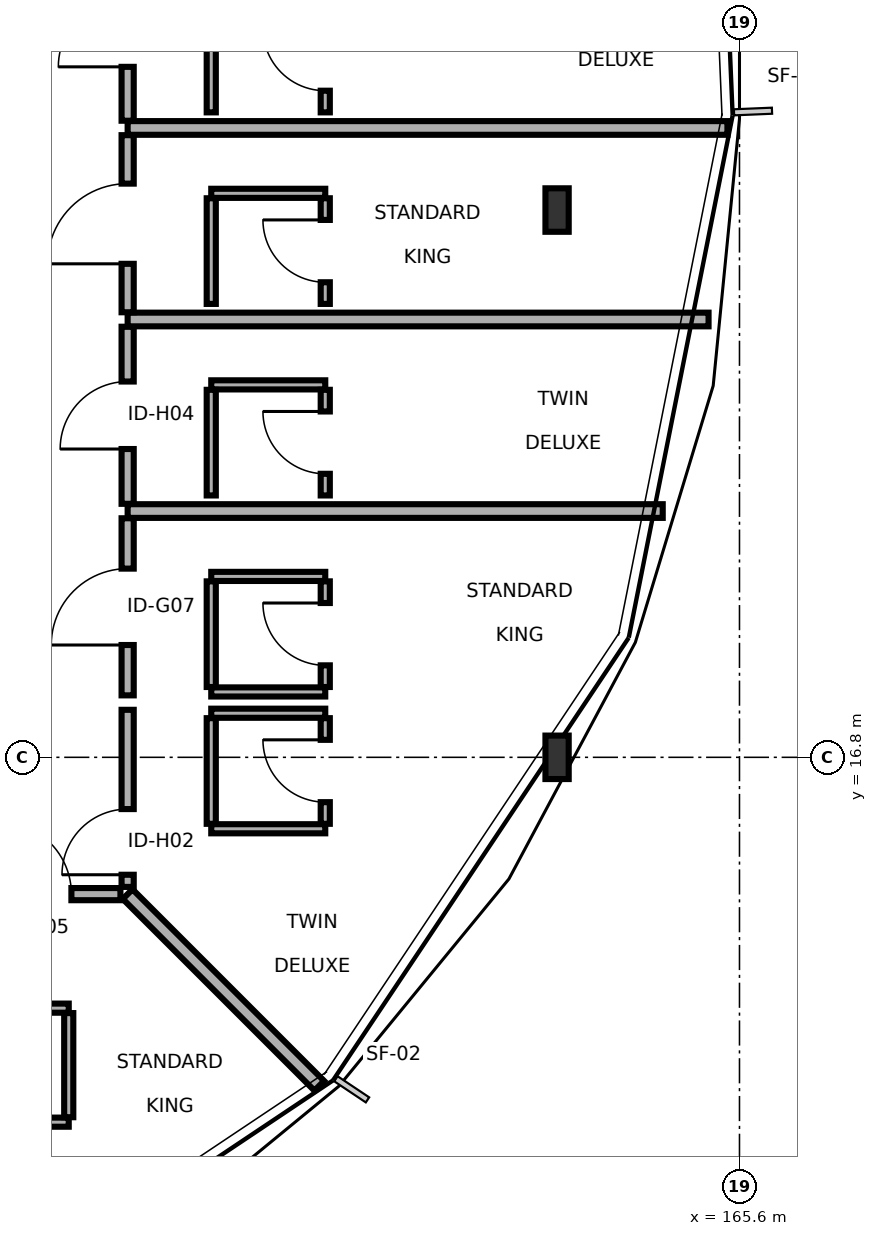
"""IFC4 building model, lengths in metres.
Left out: names, types, materials, properties, quantities, classifications, styles, units other than length and angle.
Written with IfcOpenShell. Run it as: python <this file> out.ifc"""

import sys

from ifc_helpers import new_model, si_unit, direction, frame, frame_2d, origin, origin_2d, place, context, subcontext, project, spatial, rectangle, i_section, extrude, element, fill, save


model = new_model("IFC4")
c1 = context("Model", 3, precision=1e-05, world=origin(), true_north=direction((0.0, 1.0)))
c2 = subcontext(c1, "Body", "Model", "MODEL_VIEW")
j1 = project(units=[si_unit("LENGTHUNIT", "METRE"), si_unit("PLANEANGLEUNIT", "RADIAN")], contexts=[c1])
p1 = place(None, origin())
s1 = spatial("IfcSite", under=j1, at=p1, CompositionType="ELEMENT")
p2 = place(p1, origin())
s2 = spatial("IfcBuilding", under=s1, at=p2, CompositionType="ELEMENT")
p3 = place(p2, frame((0.0, 0.0, 14.7)))
s3 = spatial("IfcBuildingStorey", under=s2, at=p3, CompositionType="ELEMENT", Elevation=14.7)
for number, where, z_axis, x_axis in (
    (1, (163.2, 16.8, 0.0), (0.0, 0.0, 1.0), (1.0, 0.0, 0.0)),
    (2, (163.2, 24.0, 0.0), (0.0, 0.0, 1.0), (1.0, 0.0, 0.0)),
):
    element("IfcColumn", number, at=place(p3, frame(where, z_axis=z_axis, x_axis=x_axis)), inside=s3, PredefinedType="COLUMN", context=c2, shape_type="SweptSolid", body=[
        extrude(i_section(OverallWidth=0.306, OverallDepth=0.572, WebThickness=0.021, FlangeThickness=0.04, FilletRadius=0.027, at=origin_2d()), origin(), (0.0, 0.0, 1.0), 3.4),
    ])
p4 = place(p3, frame((155.21, 15.0, 0.0), z_axis=(0.0, 0.0, 1.0), x_axis=(1.0, 0.0, 0.0)))
e3 = element("IfcWall", 3, at=p4, inside=s3, PredefinedType="PARTITIONING", context=c2, shape_type="SweptSolid", body=[
    extrude(rectangle(XDim=2.245, YDim=0.16, at=frame_2d((1.123, 0.0))), origin(), (0.0, 0.0, 1.0), 2.75),
])
p5 = place(p4, frame((0.645, 0.0, 0.0)))
e4 = element("IfcOpeningElement", 4, at=p5, cuts=e3, PredefinedType="OPENING", context=c2, shape_type="SweptSolid", body=[
    extrude(rectangle(XDim=0.955, YDim=2.05, at=frame_2d((0.478, 1.025))), frame((0.0, 0.09, 0.0), z_axis=(0.0, -1.0, 0.0), x_axis=(1.0, 0.0, 0.0)), (0.0, 0.0, 1.0), 0.18),
])
p6 = place(p3, frame((155.255, 12.0, 0.0), z_axis=(0.0, 0.0, 1.0), x_axis=(1.0, 0.0, 0.0)))
e5 = element("IfcWall", 5, at=p6, inside=s3, PredefinedType="PARTITIONING", context=c2, shape_type="SweptSolid", body=[
    extrude(rectangle(XDim=1.52, YDim=0.12, at=frame_2d((0.76, 0.0))), origin(), (0.0, 0.0, 1.0), 2.75),
])
p7 = place(p6, frame((0.35, 0.0, 0.0)))
e6 = element("IfcOpeningElement", 6, at=p7, cuts=e5, PredefinedType="OPENING", context=c2, shape_type="SweptSolid", body=[
    extrude(rectangle(XDim=0.82, YDim=2.08, at=frame_2d((0.41, 1.04))), frame((0.0, 0.07, 0.0), z_axis=(0.0, -1.0, 0.0), x_axis=(1.0, 0.0, 0.0)), (0.0, 0.0, 1.0), 0.14),
])
p8 = place(p3, frame((155.255, 13.5, 0.0), z_axis=(0.0, 0.0, 1.0), x_axis=(1.0, 0.0, 0.0)))
e7 = element("IfcWall", 7, at=p8, inside=s3, PredefinedType="PARTITIONING", context=c2, shape_type="SweptSolid", body=[
    extrude(rectangle(XDim=1.52, YDim=0.12, at=frame_2d((0.76, 0.0))), origin(), (0.0, 0.0, 1.0), 2.75),
])
p9 = place(p3, frame((156.775, 12.065, 0.0), z_axis=(0.0, 0.0, 1.0), x_axis=(0.0, 1.0, 0.0)))
e8 = element("IfcWall", 8, at=p9, inside=s3, PredefinedType="PARTITIONING", context=c2, shape_type="SweptSolid", body=[
    extrude(rectangle(XDim=1.37, YDim=0.12, at=frame_2d((0.685, 0.0))), origin(), (0.0, 0.0, 1.0), 3.215),
])
p10 = place(p3, frame((157.55, 15.0, 0.0), z_axis=(0.0, 0.0, 1.0), x_axis=(0.707106781187, -0.707106781187, 0.0)))
e9 = element("IfcWall", 9, at=p10, inside=s3, PredefinedType="PARTITIONING", context=c2, shape_type="SweptSolid", body=[
    extrude(rectangle(XDim=3.565, YDim=0.18, at=frame_2d((1.783, 0.0))), origin(), (0.0, 0.0, 1.0), 2.76),
])
p11 = place(p3, frame((157.55, 15.095, 0.0), z_axis=(0.0, 0.0, 1.0), x_axis=(0.0, 1.0, 0.0)))
e10 = element("IfcWall", 10, at=p11, inside=s3, PredefinedType="PARTITIONING", context=c2, shape_type="SweptSolid", body=[
    extrude(rectangle(XDim=2.33, YDim=0.16, at=frame_2d((1.165, 0.0))), origin(), (0.0, 0.0, 1.0), 2.75),
])
p12 = place(p11, frame((0.16, 0.0, 0.0)))
e11 = element("IfcOpeningElement", 11, at=p12, cuts=e10, PredefinedType="OPENING", context=c2, shape_type="SweptSolid", body=[
    extrude(rectangle(XDim=0.864, YDim=2.13, at=frame_2d((0.432, 1.065))), frame((0.0, 0.09, 0.0), z_axis=(0.0, -1.0, 0.0), x_axis=(1.0, 0.0, 0.0)), (0.0, 0.0, 1.0), 0.18),
])
for number, where, z_axis, x_axis in (
    (12, (158.65, 15.86, 0.0), (0.0, 0.0, 1.0), (1.0, 0.0, 0.0)),
    (13, (158.65, 17.38, 0.0), (0.0, 0.0, 1.0), (1.0, 0.0, 0.0)),
):
    element("IfcWall", number, at=place(p3, frame(where, z_axis=z_axis, x_axis=x_axis)), inside=s3, PredefinedType="PARTITIONING", context=c2, shape_type="SweptSolid", body=[
        extrude(rectangle(XDim=1.5, YDim=0.12, at=frame_2d((0.75, 0.0))), origin(), (0.0, 0.0, 1.0), 3.215),
    ])
p13 = place(p3, frame((158.65, 15.925, 0.0), z_axis=(0.0, 0.0, 1.0), x_axis=(0.0, 1.0, 0.0)))
e14 = element("IfcWall", 14, at=p13, inside=s3, PredefinedType="PARTITIONING", context=c2, shape_type="SweptSolid", body=[
    extrude(rectangle(XDim=1.39, YDim=0.12, at=frame_2d((0.695, 0.0))), origin(), (0.0, 0.0, 1.0), 2.75),
])
p14 = place(p3, frame((160.15, 15.925, 0.0), z_axis=(0.0, 0.0, 1.0), x_axis=(0.0, 1.0, 0.0)))
e15 = element("IfcWall", 15, at=p14, inside=s3, PredefinedType="PARTITIONING", context=c2, shape_type="SweptSolid", body=[
    extrude(rectangle(XDim=1.39, YDim=0.12, at=frame_2d((0.695, 0.0))), origin(), (0.0, 0.0, 1.0), 2.75),
])
p15 = place(p14, frame((0.285, 0.0, 0.0)))
e16 = element("IfcOpeningElement", 16, at=p15, cuts=e15, PredefinedType="OPENING", context=c2, shape_type="SweptSolid", body=[
    extrude(rectangle(XDim=0.82, YDim=2.08, at=frame_2d((0.41, 1.04))), frame((0.0, 0.07, 0.0), z_axis=(0.0, -1.0, 0.0), x_axis=(1.0, 0.0, 0.0)), (0.0, 0.0, 1.0), 0.14),
])
p16 = place(p3, frame((157.55, 17.615, 0.0), z_axis=(0.0, 0.0, 1.0), x_axis=(0.0, 1.0, 0.0)))
e17 = element("IfcWall", 17, at=p16, inside=s3, PredefinedType="PARTITIONING", context=c2, shape_type="SweptSolid", body=[
    extrude(rectangle(XDim=2.33, YDim=0.16, at=frame_2d((1.165, 0.0))), origin(), (0.0, 0.0, 1.0), 3.215),
])
p17 = place(p16, frame((0.663, 0.0, 0.0)))
e18 = element("IfcOpeningElement", 18, at=p17, cuts=e17, PredefinedType="OPENING", context=c2, shape_type="SweptSolid", body=[
    extrude(rectangle(XDim=1.005, YDim=2.05, at=frame_2d((0.502, 1.025))), frame((0.0, 0.09, 0.0), z_axis=(0.0, -1.0, 0.0), x_axis=(1.0, 0.0, 0.0)), (0.0, 0.0, 1.0), 0.18),
])
for number, where, z_axis, x_axis in (
    (19, (158.65, 17.66, 0.0), (0.0, 0.0, 1.0), (1.0, 0.0, 0.0)),
    (20, (158.65, 19.18, 0.0), (0.0, 0.0, 1.0), (1.0, 0.0, 0.0)),
):
    element("IfcWall", number, at=place(p3, frame(where, z_axis=z_axis, x_axis=x_axis)), inside=s3, PredefinedType="PARTITIONING", context=c2, shape_type="SweptSolid", body=[
        extrude(rectangle(XDim=1.5, YDim=0.12, at=frame_2d((0.75, 0.0))), origin(), (0.0, 0.0, 1.0), 3.215),
    ])
p18 = place(p3, frame((158.65, 17.725, 0.0), z_axis=(0.0, 0.0, 1.0), x_axis=(0.0, 1.0, 0.0)))
e21 = element("IfcWall", 21, at=p18, inside=s3, PredefinedType="PARTITIONING", context=c2, shape_type="SweptSolid", body=[
    extrude(rectangle(XDim=1.39, YDim=0.12, at=frame_2d((0.695, 0.0))), origin(), (0.0, 0.0, 1.0), 3.215),
])
p19 = place(p3, frame((160.15, 17.725, 0.0), z_axis=(0.0, 0.0, 1.0), x_axis=(0.0, 1.0, 0.0)))
e22 = element("IfcWall", 22, at=p19, inside=s3, PredefinedType="PARTITIONING", context=c2, shape_type="SweptSolid", body=[
    extrude(rectangle(XDim=1.39, YDim=0.12, at=frame_2d((0.695, 0.0))), origin(), (0.0, 0.0, 1.0), 3.215),
])
p20 = place(p19, frame((0.285, 0.0, 0.0)))
e23 = element("IfcOpeningElement", 23, at=p20, cuts=e22, PredefinedType="OPENING", context=c2, shape_type="SweptSolid", body=[
    extrude(rectangle(XDim=0.82, YDim=2.08, at=frame_2d((0.41, 1.04))), frame((0.0, 0.07, 0.0), z_axis=(0.0, -1.0, 0.0), x_axis=(1.0, 0.0, 0.0)), (0.0, 0.0, 1.0), 0.14),
])
p21 = place(p3, frame((157.55, 20.04, 0.0), z_axis=(0.0, 0.0, 1.0), x_axis=(1.0, 0.0, 0.0)))
e24 = element("IfcWall", 24, at=p21, inside=s3, PredefinedType="PARTITIONING", context=c2, shape_type="SweptSolid", body=[
    extrude(rectangle(XDim=7.04, YDim=0.18, at=frame_2d((3.52, 0.0))), origin(), (0.0, 0.0, 1.0), 2.76),
])
p22 = place(p3, frame((157.55, 20.135, 0.0), z_axis=(0.0, 0.0, 1.0), x_axis=(0.0, 1.0, 0.0)))
e25 = element("IfcWall", 25, at=p22, inside=s3, PredefinedType="PARTITIONING", context=c2, shape_type="SweptSolid", body=[
    extrude(rectangle(XDim=2.33, YDim=0.16, at=frame_2d((1.165, 0.0))), origin(), (0.0, 0.0, 1.0), 3.215),
])
p23 = place(p22, frame((0.721, 0.0, 0.0)))
e26 = element("IfcOpeningElement", 26, at=p23, cuts=e25, PredefinedType="OPENING", context=c2, shape_type="SweptSolid", body=[
    extrude(rectangle(XDim=0.888, YDim=2.07, at=frame_2d((0.444, 1.035))), frame((0.0, 0.09, 0.0), z_axis=(0.0, -1.0, 0.0), x_axis=(1.0, 0.0, 0.0)), (0.0, 0.0, 1.0), 0.18),
])
p24 = place(p3, frame((158.65, 21.7, 0.0), z_axis=(0.0, 0.0, 1.0), x_axis=(1.0, 0.0, 0.0)))
e27 = element("IfcWall", 27, at=p24, inside=s3, PredefinedType="PARTITIONING", context=c2, shape_type="SweptSolid", body=[
    extrude(rectangle(XDim=1.5, YDim=0.12, at=frame_2d((0.75, 0.0))), origin(), (0.0, 0.0, 1.0), 3.215),
])
p25 = place(p3, frame((158.65, 20.245, 0.0), z_axis=(0.0, 0.0, 1.0), x_axis=(0.0, 1.0, 0.0)))
e28 = element("IfcWall", 28, at=p25, inside=s3, PredefinedType="PARTITIONING", context=c2, shape_type="SweptSolid", body=[
    extrude(rectangle(XDim=1.39, YDim=0.12, at=frame_2d((0.695, 0.0))), origin(), (0.0, 0.0, 1.0), 3.215),
])
p26 = place(p3, frame((160.15, 20.245, 0.0), z_axis=(0.0, 0.0, 1.0), x_axis=(0.0, 1.0, 0.0)))
e29 = element("IfcWall", 29, at=p26, inside=s3, PredefinedType="PARTITIONING", context=c2, shape_type="SweptSolid", body=[
    extrude(rectangle(XDim=1.39, YDim=0.12, at=frame_2d((0.695, 0.0))), origin(), (0.0, 0.0, 1.0), 3.215),
])
p27 = place(p26, frame((0.285, 0.0, 0.0)))
e30 = element("IfcOpeningElement", 30, at=p27, cuts=e29, PredefinedType="OPENING", context=c2, shape_type="SweptSolid", body=[
    extrude(rectangle(XDim=0.82, YDim=2.08, at=frame_2d((0.41, 1.04))), frame((0.0, 0.07, 0.0), z_axis=(0.0, -1.0, 0.0), x_axis=(1.0, 0.0, 0.0)), (0.0, 0.0, 1.0), 0.14),
])
p28 = place(p3, frame((157.55, 22.56, 0.0), z_axis=(0.0, 0.0, 1.0), x_axis=(1.0, 0.0, 0.0)))
e31 = element("IfcWall", 31, at=p28, inside=s3, PredefinedType="PARTITIONING", context=c2, shape_type="SweptSolid", body=[
    extrude(rectangle(XDim=7.643, YDim=0.18, at=frame_2d((3.822, 0.0))), origin(), (0.0, 0.0, 1.0), 2.76),
])
p29 = place(p3, frame((157.55, 22.655, 0.0), z_axis=(0.0, 0.0, 1.0), x_axis=(0.0, 1.0, 0.0)))
e32 = element("IfcWall", 32, at=p29, inside=s3, PredefinedType="PARTITIONING", context=c2, shape_type="SweptSolid", body=[
    extrude(rectangle(XDim=2.33, YDim=0.16, at=frame_2d((1.165, 0.0))), origin(), (0.0, 0.0, 1.0), 2.75),
])
p30 = place(p29, frame((0.637, 0.0, 0.0)))
e33 = element("IfcOpeningElement", 33, at=p30, cuts=e32, PredefinedType="OPENING", context=c2, shape_type="SweptSolid", body=[
    extrude(rectangle(XDim=1.055, YDim=2.05, at=frame_2d((0.527, 1.025))), frame((0.0, 0.09, 0.0), z_axis=(0.0, -1.0, 0.0), x_axis=(1.0, 0.0, 0.0)), (0.0, 0.0, 1.0), 0.18),
])
p31 = place(p3, frame((158.65, 24.22, 0.0), z_axis=(0.0, 0.0, 1.0), x_axis=(1.0, 0.0, 0.0)))
e34 = element("IfcWall", 34, at=p31, inside=s3, PredefinedType="PARTITIONING", context=c2, shape_type="SweptSolid", body=[
    extrude(rectangle(XDim=1.5, YDim=0.12, at=frame_2d((0.75, 0.0))), origin(), (0.0, 0.0, 1.0), 2.75),
])
p32 = place(p3, frame((158.65, 22.765, 0.0), z_axis=(0.0, 0.0, 1.0), x_axis=(0.0, 1.0, 0.0)))
e35 = element("IfcWall", 35, at=p32, inside=s3, PredefinedType="PARTITIONING", context=c2, shape_type="SweptSolid", body=[
    extrude(rectangle(XDim=1.39, YDim=0.12, at=frame_2d((0.695, 0.0))), origin(), (0.0, 0.0, 1.0), 2.75),
])
p33 = place(p3, frame((160.15, 22.765, 0.0), z_axis=(0.0, 0.0, 1.0), x_axis=(0.0, 1.0, 0.0)))
e36 = element("IfcWall", 36, at=p33, inside=s3, PredefinedType="PARTITIONING", context=c2, shape_type="SweptSolid", body=[
    extrude(rectangle(XDim=1.39, YDim=0.12, at=frame_2d((0.695, 0.0))), origin(), (0.0, 0.0, 1.0), 2.75),
])
p34 = place(p33, frame((0.285, 0.0, 0.0)))
e37 = element("IfcOpeningElement", 37, at=p34, cuts=e36, PredefinedType="OPENING", context=c2, shape_type="SweptSolid", body=[
    extrude(rectangle(XDim=0.82, YDim=2.08, at=frame_2d((0.41, 1.04))), frame((0.0, 0.07, 0.0), z_axis=(0.0, -1.0, 0.0), x_axis=(1.0, 0.0, 0.0)), (0.0, 0.0, 1.0), 0.14),
])
p35 = place(p3, frame((157.55, 25.08, 0.0), z_axis=(0.0, 0.0, 1.0), x_axis=(1.0, 0.0, 0.0)))
e38 = element("IfcWall", 38, at=p35, inside=s3, PredefinedType="PARTITIONING", context=c2, shape_type="SweptSolid", body=[
    extrude(rectangle(XDim=7.891, YDim=0.18, at=frame_2d((3.946, 0.0))), origin(), (0.0, 0.0, 1.0), 2.76),
])
p36 = place(p3, frame((157.55, 25.175, 0.0), z_axis=(0.0, 0.0, 1.0), x_axis=(0.0, 1.0, 0.0)))
e39 = element("IfcWall", 39, at=p36, inside=s3, PredefinedType="PARTITIONING", context=c2, shape_type="SweptSolid", body=[
    extrude(rectangle(XDim=2.33, YDim=0.16, at=frame_2d((1.165, 0.0))), origin(), (0.0, 0.0, 1.0), 3.215),
])
p37 = place(p36, frame((0.709, 0.0, 0.0)))
e40 = element("IfcOpeningElement", 40, at=p37, cuts=e39, PredefinedType="OPENING", context=c2, shape_type="SweptSolid", body=[
    extrude(rectangle(XDim=0.912, YDim=2.13, at=frame_2d((0.456, 1.065))), frame((0.0, 0.09, 0.0), z_axis=(0.0, -1.0, 0.0), x_axis=(1.0, 0.0, 0.0)), (0.0, 0.0, 1.0), 0.18),
])
p38 = place(p3, frame((158.65, 25.285, 0.0), z_axis=(0.0, 0.0, 1.0), x_axis=(0.0, 1.0, 0.0)))
e41 = element("IfcWall", 41, at=p38, inside=s3, PredefinedType="PARTITIONING", context=c2, shape_type="SweptSolid", body=[
    extrude(rectangle(XDim=1.39, YDim=0.12, at=frame_2d((0.695, 0.0))), origin(), (0.0, 0.0, 1.0), 3.215),
])
p39 = place(p3, frame((160.15, 25.285, 0.0), z_axis=(0.0, 0.0, 1.0), x_axis=(0.0, 1.0, 0.0)))
e42 = element("IfcWall", 42, at=p39, inside=s3, PredefinedType="PARTITIONING", context=c2, shape_type="SweptSolid", body=[
    extrude(rectangle(XDim=1.39, YDim=0.12, at=frame_2d((0.695, 0.0))), origin(), (0.0, 0.0, 1.0), 3.215),
])
p40 = place(p39, frame((0.285, 0.0, 0.0)))
e43 = element("IfcOpeningElement", 43, at=p40, cuts=e42, PredefinedType="OPENING", context=c2, shape_type="SweptSolid", body=[
    extrude(rectangle(XDim=0.82, YDim=2.08, at=frame_2d((0.41, 1.04))), frame((0.0, 0.07, 0.0), z_axis=(0.0, -1.0, 0.0), x_axis=(1.0, 0.0, 0.0)), (0.0, 0.0, 1.0), 0.14),
])
p41 = place(p5, origin())
e44 = element("IfcDoor", 44, at=p41, inside=s3, OperationType="SINGLE_SWING_LEFT", PredefinedType="DOOR", context=c2, shape_type="SweptSolid", body=[
    extrude(rectangle(XDim=0.955, YDim=2.05, at=frame_2d((0.478, 1.025))), frame((0.0, 0.025, 0.0), z_axis=(0.0, -1.0, 0.0), x_axis=(1.0, 0.0, 0.0)), (0.0, 0.0, 1.0), 0.05),
])
fill(e4, e44)
p42 = place(p12, origin())
e45 = element("IfcDoor", 45, at=p42, inside=s3, OperationType="SINGLE_SWING_LEFT", PredefinedType="DOOR", context=c2, shape_type="SweptSolid", body=[
    extrude(rectangle(XDim=0.864, YDim=2.13, at=frame_2d((0.432, 1.065))), frame((0.0, 0.025, 0.0), z_axis=(0.0, -1.0, 0.0), x_axis=(1.0, 0.0, 0.0)), (0.0, 0.0, 1.0), 0.05),
])
fill(e11, e45)
p43 = place(p15, origin())
e46 = element("IfcDoor", 46, at=p43, inside=s3, OperationType="SINGLE_SWING_RIGHT", PredefinedType="DOOR", context=c2, shape_type="SweptSolid", body=[
    extrude(rectangle(XDim=0.82, YDim=2.08, at=frame_2d((0.41, 1.04))), frame((0.0, 0.025, 0.0), z_axis=(0.0, -1.0, 0.0), x_axis=(1.0, 0.0, 0.0)), (0.0, 0.0, 1.0), 0.05),
])
fill(e16, e46)
p44 = place(p17, origin())
e47 = element("IfcDoor", 47, at=p44, inside=s3, OperationType="SINGLE_SWING_LEFT", PredefinedType="DOOR", context=c2, shape_type="SweptSolid", body=[
    extrude(rectangle(XDim=1.005, YDim=2.05, at=frame_2d((0.502, 1.025))), frame((0.0, 0.025, 0.0), z_axis=(0.0, -1.0, 0.0), x_axis=(1.0, 0.0, 0.0)), (0.0, 0.0, 1.0), 0.05),
])
fill(e18, e47)
p45 = place(p20, origin())
e48 = element("IfcDoor", 48, at=p45, inside=s3, OperationType="SINGLE_SWING_RIGHT", PredefinedType="DOOR", context=c2, shape_type="SweptSolid", body=[
    extrude(rectangle(XDim=0.82, YDim=2.08, at=frame_2d((0.41, 1.04))), frame((0.0, 0.025, 0.0), z_axis=(0.0, -1.0, 0.0), x_axis=(1.0, 0.0, 0.0)), (0.0, 0.0, 1.0), 0.05),
])
fill(e23, e48)
p46 = place(p23, origin())
e49 = element("IfcDoor", 49, at=p46, inside=s3, OperationType="SINGLE_SWING_LEFT", PredefinedType="DOOR", context=c2, shape_type="SweptSolid", body=[
    extrude(rectangle(XDim=0.888, YDim=2.07, at=frame_2d((0.444, 1.035))), frame((0.0, 0.025, 0.0), z_axis=(0.0, -1.0, 0.0), x_axis=(1.0, 0.0, 0.0)), (0.0, 0.0, 1.0), 0.05),
])
fill(e26, e49)
p47 = place(p27, origin())
e50 = element("IfcDoor", 50, at=p47, inside=s3, OperationType="SINGLE_SWING_RIGHT", PredefinedType="DOOR", context=c2, shape_type="SweptSolid", body=[
    extrude(rectangle(XDim=0.82, YDim=2.08, at=frame_2d((0.41, 1.04))), frame((0.0, 0.025, 0.0), z_axis=(0.0, -1.0, 0.0), x_axis=(1.0, 0.0, 0.0)), (0.0, 0.0, 1.0), 0.05),
])
fill(e30, e50)
p48 = place(p30, origin())
e51 = element("IfcDoor", 51, at=p48, inside=s3, OperationType="SINGLE_SWING_LEFT", PredefinedType="DOOR", context=c2, shape_type="SweptSolid", body=[
    extrude(rectangle(XDim=1.055, YDim=2.05, at=frame_2d((0.527, 1.025))), frame((0.0, 0.025, 0.0), z_axis=(0.0, -1.0, 0.0), x_axis=(1.0, 0.0, 0.0)), (0.0, 0.0, 1.0), 0.05),
])
fill(e33, e51)
p49 = place(p34, origin())
e52 = element("IfcDoor", 52, at=p49, inside=s3, OperationType="SINGLE_SWING_RIGHT", PredefinedType="DOOR", context=c2, shape_type="SweptSolid", body=[
    extrude(rectangle(XDim=0.82, YDim=2.08, at=frame_2d((0.41, 1.04))), frame((0.0, 0.025, 0.0), z_axis=(0.0, -1.0, 0.0), x_axis=(1.0, 0.0, 0.0)), (0.0, 0.0, 1.0), 0.05),
])
fill(e37, e52)
p50 = place(p37, origin())
e53 = element("IfcDoor", 53, at=p50, inside=s3, OperationType="SINGLE_SWING_LEFT", PredefinedType="DOOR", context=c2, shape_type="SweptSolid", body=[
    extrude(rectangle(XDim=0.912, YDim=2.13, at=frame_2d((0.456, 1.065))), frame((0.0, 0.025, 0.0), z_axis=(0.0, -1.0, 0.0), x_axis=(1.0, 0.0, 0.0)), (0.0, 0.0, 1.0), 0.05),
])
fill(e40, e53)
p51 = place(p40, origin())
e54 = element("IfcDoor", 54, at=p51, inside=s3, OperationType="SINGLE_SWING_RIGHT", PredefinedType="DOOR", context=c2, shape_type="SweptSolid", body=[
    extrude(rectangle(XDim=0.82, YDim=2.08, at=frame_2d((0.41, 1.04))), frame((0.0, 0.025, 0.0), z_axis=(0.0, -1.0, 0.0), x_axis=(1.0, 0.0, 0.0)), (0.0, 0.0, 1.0), 0.05),
])
fill(e43, e54)
save(model, sys.argv[1])
